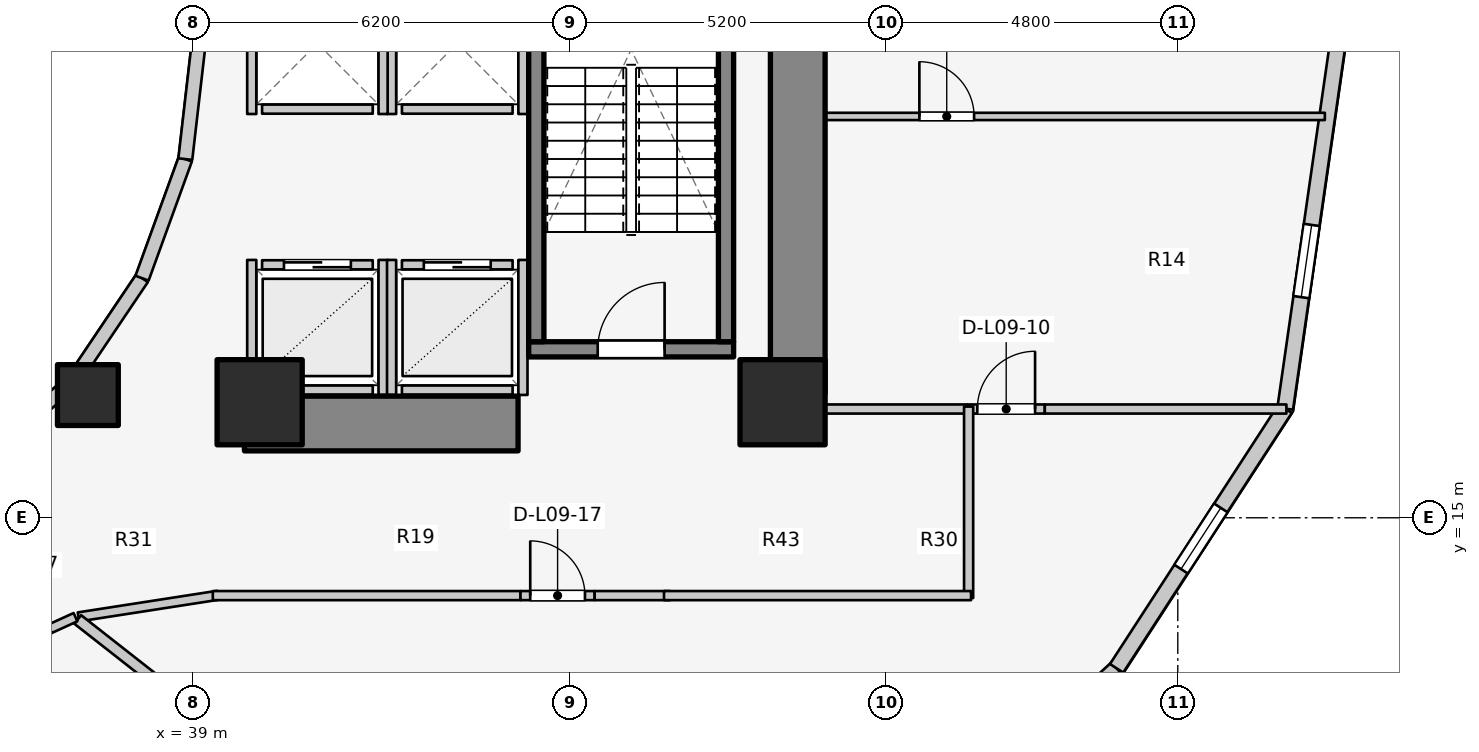
"""IFC4 building model, lengths in metres.
Left out: names, types, materials, properties, quantities, classifications, styles, units other than length and angle.
Written with IfcOpenShell. Run it as: python <this file> out.ifc"""

import sys

from ifc_helpers import new_model, si_unit, direction, frame, frame_2d, origin, origin_2d, place, context, subcontext, project, spatial, rectangle, extrude, element, fill, save


model = new_model("IFC4")
c1 = context("Model", 3, precision=1e-05, world=origin(), true_north=direction((0.0, 1.0)))
c2 = subcontext(c1, "Body", "Model", "MODEL_VIEW")
j1 = project(units=[si_unit("LENGTHUNIT", "METRE"), si_unit("PLANEANGLEUNIT", "RADIAN")], contexts=[c1])
p1 = place(None, origin())
s1 = spatial("IfcSite", under=j1, at=p1, CompositionType="ELEMENT")
p2 = place(p1, origin())
s2 = spatial("IfcBuilding", under=s1, at=p2, CompositionType="ELEMENT")
p3 = place(p2, frame((0.0, 0.0, 33.8)))
s3 = spatial("IfcBuildingStorey", under=s2, at=p3, CompositionType="ELEMENT", Elevation=33.8)
p4 = place(p3, frame((48.95, 17.05, 0.0), z_axis=(0.0, 0.0, 1.0), x_axis=(0.0, 1.0, 0.0)))
e1 = element("IfcWall", 1, at=p4, inside=s3, PredefinedType="SHEAR", context=c2, shape_type="SweptSolid", body=[
    extrude(rectangle(XDim=12.8, YDim=0.9, at=frame_2d((6.4, 0.0))), origin(), (0.0, 0.0, 1.0), 3.1),
])
p5 = place(p3, frame((39.85, 16.55, 0.0), z_axis=(0.0, 0.0, 1.0), x_axis=(1.0, 0.0, 0.0)))
e2 = element("IfcWall", 2, at=p5, inside=s3, PredefinedType="SHEAR", context=c2, shape_type="SweptSolid", body=[
    extrude(rectangle(XDim=4.5, YDim=0.9, at=frame_2d((2.25, 0.0))), origin(), (0.0, 0.0, 1.0), 3.1),
])
p6 = place(p3, frame((44.525, 17.77, 0.0), z_axis=(0.0, 0.0, 1.0), x_axis=(1.0, 0.0, 0.0)))
e3 = element("IfcWall", 3, at=p6, inside=s3, PredefinedType="SOLIDWALL", context=c2, shape_type="SweptSolid", body=[
    extrude(rectangle(XDim=3.37, YDim=0.25, at=frame_2d((1.685, 0.0))), origin(), (0.0, 0.0, 1.0), 3.1),
])
p7 = place(p6, frame((1.135, 0.0, 0.0)))
e4 = element("IfcOpeningElement", 4, at=p7, cuts=e3, PredefinedType="OPENING", context=c2, shape_type="SweptSolid", body=[
    extrude(rectangle(XDim=1.1, YDim=2.1, at=frame_2d((0.55, 1.05))), frame((0.0, 0.135, 0.0), z_axis=(0.0, -1.0, 0.0), x_axis=(1.0, 0.0, 0.0)), (0.0, 0.0, 1.0), 0.27),
])
for number, where, z_axis, x_axis in (
    (5, (44.65, 17.895, 0.0), (0.0, 0.0, 1.0), (0.0, 1.0, 0.0)),
    (6, (47.77, 17.895, 0.0), (0.0, 0.0, 1.0), (0.0, 1.0, 0.0)),
):
    element("IfcWall", number, at=place(p3, frame(where, z_axis=z_axis, x_axis=x_axis)), inside=s3, PredefinedType="SOLIDWALL", context=c2, shape_type="SweptSolid", body=[
        extrude(rectangle(XDim=7.81, YDim=0.25, at=frame_2d((3.905, 0.0))), origin(), (0.0, 0.0, 1.0), 3.1),
    ])
for number, where, z_axis, x_axis in (
    (7, (40.1, 16.9, 0.0), (0.0, 0.0, 1.0), (1.0, 0.0, 0.0)),
    (8, (48.7, 16.9, 0.0), (0.0, 0.0, 1.0), (1.0, 0.0, 0.0)),
):
    element("IfcColumn", number, at=place(p3, frame(where, z_axis=z_axis, x_axis=x_axis)), inside=s3, PredefinedType="COLUMN", context=c2, shape_type="SweptSolid", body=[
        extrude(rectangle(XDim=1.4, YDim=1.4, at=origin_2d()), origin(), (0.0, 0.0, 1.0), 3.1),
    ])
p8 = place(p3, frame((37.275, 17.018, 0.0), z_axis=(0.0, 0.0, 1.0), x_axis=(1.0, 0.0, 0.0)))
e9 = element("IfcColumn", 9, at=p8, inside=s3, PredefinedType="COLUMN", context=c2, shape_type="SweptSolid", body=[
    extrude(rectangle(XDim=1.0, YDim=1.0, at=origin_2d()), origin(), (0.0, 0.0, 1.0), 3.1),
])
p9 = place(p3, frame((35.56, 15.968, 0.0), z_axis=(0.0, 0.0, 1.0), x_axis=(0.752576694707, 0.658504607869, 0.0)))
e10 = element("IfcWall", 10, at=p9, inside=s3, PredefinedType="STANDARD", context=c2, shape_type="SweptSolid", body=[
    extrude(rectangle(XDim=1.959, YDim=0.23, at=frame_2d((0.98, 0.0))), origin(), (0.0, 0.0, 1.0), 1.22),
])
p10 = place(p3, frame((37.035, 17.258, 0.0), z_axis=(0.0, 0.0, 1.0), x_axis=(0.558197800898, 0.829707909492, 0.0)))
e11 = element("IfcWall", 11, at=p10, inside=s3, PredefinedType="STANDARD", context=c2, shape_type="SweptSolid", body=[
    extrude(rectangle(XDim=2.027, YDim=0.23, at=frame_2d((1.013, 0.0))), origin(), (0.0, 0.0, 1.0), 1.22),
])
p11 = place(p3, frame((38.166, 18.94, 0.0), z_axis=(0.0, 0.0, 1.0), x_axis=(0.341423187295, 0.93990968033, 0.0)))
e12 = element("IfcWall", 12, at=p11, inside=s3, PredefinedType="STANDARD", context=c2, shape_type="SweptSolid", body=[
    extrude(rectangle(XDim=2.084, YDim=0.23, at=frame_2d((1.042, 0.0))), origin(), (0.0, 0.0, 1.0), 2.56),
])
p12 = place(p3, frame((38.877, 20.898, 0.0), z_axis=(0.0, 0.0, 1.0), x_axis=(0.114711713601, 0.993398823617, 0.0)))
e13 = element("IfcWall", 13, at=p12, inside=s3, PredefinedType="STANDARD", context=c2, shape_type="SweptSolid", body=[
    extrude(rectangle(XDim=2.115, YDim=0.23, at=frame_2d((1.058, 0.0))), origin(), (0.0, 0.0, 1.0), 2.56),
])
p13 = place(p3, frame((50.405, 9.035, 0.0), z_axis=(0.0, 0.0, 1.0), x_axis=(0.735655109293, 0.67735630223, 0.0)))
e14 = element("IfcWall", 14, at=p13, inside=s3, PredefinedType="STANDARD", context=c2, shape_type="SweptSolid", body=[
    extrude(rectangle(XDim=5.151, YDim=0.26, at=frame_2d((2.575, 0.0))), origin(), (0.0, 0.0, 1.0), 1.22),
])
p14 = place(p13, frame((1.976, 0.0, 0.15)))
e15 = element("IfcOpeningElement", 15, at=p14, cuts=e14, PredefinedType="OPENING", context=c2, shape_type="SweptSolid", body=[
    extrude(rectangle(XDim=1.2, YDim=0.9, at=frame_2d((0.6, 0.45))), frame((0.0, 0.14, 0.0), z_axis=(0.0, -1.0, 0.0), x_axis=(1.0, 0.0, 0.0)), (0.0, 0.0, 1.0), 0.28),
])
p15 = place(p3, frame((54.194, 12.524, 0.0), z_axis=(0.0, 0.0, 1.0), x_axis=(0.544578722263, 0.838709732421, 0.0)))
e16 = element("IfcWall", 16, at=p15, inside=s3, PredefinedType="STANDARD", context=c2, shape_type="SweptSolid", body=[
    extrude(rectangle(XDim=5.092, YDim=0.26, at=frame_2d((2.546, 0.0))), origin(), (0.0, 0.0, 1.0), 1.22),
])
p16 = place(p15, frame((1.946, 0.0, 0.15)))
e17 = element("IfcOpeningElement", 17, at=p16, cuts=e16, PredefinedType="OPENING", context=c2, shape_type="SweptSolid", body=[
    extrude(rectangle(XDim=1.2, YDim=0.9, at=frame_2d((0.6, 0.45))), frame((0.0, 0.14, 0.0), z_axis=(0.0, -1.0, 0.0), x_axis=(1.0, 0.0, 0.0)), (0.0, 0.0, 1.0), 0.28),
])
p17 = place(p3, frame((56.967, 16.795, 0.0), z_axis=(0.0, 0.0, 1.0), x_axis=(0.142528001686, 0.989790770181, 0.0)))
e18 = element("IfcWall", 18, at=p17, inside=s3, PredefinedType="STANDARD", context=c2, shape_type="SweptSolid", body=[
    extrude(rectangle(XDim=6.269, YDim=0.26, at=frame_2d((3.135, 0.0))), origin(), (0.0, 0.0, 1.0), 2.57),
])
p18 = place(p17, frame((1.852, 0.0, 0.75)))
e19 = element("IfcOpeningElement", 19, at=p18, cuts=e18, PredefinedType="OPENING", context=c2, shape_type="SweptSolid", body=[
    extrude(rectangle(XDim=1.2, YDim=1.5, at=frame_2d((0.6, 0.75))), frame((0.0, 0.14, 0.0), z_axis=(0.0, -1.0, 0.0), x_axis=(1.0, 0.0, 0.0)), (0.0, 0.0, 1.0), 0.28),
])
p19 = place(p3, frame((40.14, 19.16, 0.0), z_axis=(0.0, 0.0, 1.0), x_axis=(1.0, 0.0, 0.0)))
e20 = element("IfcWall", 20, at=p19, inside=s3, PredefinedType="SOLIDWALL", context=c2, shape_type="SweptSolid", body=[
    extrude(rectangle(XDim=1.82, YDim=0.15, at=frame_2d((0.91, 0.0))), origin(), (0.0, 0.0, 1.0), 2.12),
])
p20 = place(p19, frame((0.36, 0.0, 0.0)))
e21 = element("IfcOpeningElement", 21, at=p20, cuts=e20, PredefinedType="OPENING", context=c2, shape_type="SweptSolid", body=[
    extrude(rectangle(XDim=1.1, YDim=2.1, at=frame_2d((0.55, 1.05))), frame((0.0, 0.085, 0.0), z_axis=(0.0, -1.0, 0.0), x_axis=(1.0, 0.0, 0.0)), (0.0, 0.0, 1.0), 0.17),
])
p21 = place(p3, frame((40.14, 17.1, 0.0), z_axis=(0.0, 0.0, 1.0), x_axis=(1.0, 0.0, 0.0)))
e22 = element("IfcWall", 22, at=p21, inside=s3, PredefinedType="SOLIDWALL", context=c2, shape_type="SweptSolid", body=[
    extrude(rectangle(XDim=1.82, YDim=0.15, at=frame_2d((0.91, 0.0))), origin(), (0.0, 0.0, 1.0), 2.12),
])
p22 = place(p3, frame((39.97, 17.02, 0.0), z_axis=(0.0, 0.0, 1.0), x_axis=(0.0, 1.0, 0.0)))
e23 = element("IfcWall", 23, at=p22, inside=s3, PredefinedType="SOLIDWALL", context=c2, shape_type="SweptSolid", body=[
    extrude(rectangle(XDim=2.22, YDim=0.15, at=frame_2d((1.11, 0.0))), origin(), (0.0, 0.0, 1.0), 1.873),
])
p23 = place(p3, frame((42.13, 17.02, 0.0), z_axis=(0.0, 0.0, 1.0), x_axis=(0.0, 1.0, 0.0)))
e24 = element("IfcWall", 24, at=p23, inside=s3, PredefinedType="SOLIDWALL", context=c2, shape_type="SweptSolid", body=[
    extrude(rectangle(XDim=2.22, YDim=0.15, at=frame_2d((1.11, 0.0))), origin(), (0.0, 0.0, 1.0), 2.575),
])
p24 = place(p3, frame((42.44, 19.16, 0.0), z_axis=(0.0, 0.0, 1.0), x_axis=(1.0, 0.0, 0.0)))
e25 = element("IfcWall", 25, at=p24, inside=s3, PredefinedType="SOLIDWALL", context=c2, shape_type="SweptSolid", body=[
    extrude(rectangle(XDim=1.82, YDim=0.15, at=frame_2d((0.91, 0.0))), origin(), (0.0, 0.0, 1.0), 2.575),
])
p25 = place(p24, frame((0.36, 0.0, 0.0)))
e26 = element("IfcOpeningElement", 26, at=p25, cuts=e25, PredefinedType="OPENING", context=c2, shape_type="SweptSolid", body=[
    extrude(rectangle(XDim=1.1, YDim=2.1, at=frame_2d((0.55, 1.05))), frame((0.0, 0.085, 0.0), z_axis=(0.0, -1.0, 0.0), x_axis=(1.0, 0.0, 0.0)), (0.0, 0.0, 1.0), 0.17),
])
p26 = place(p3, frame((42.44, 17.1, 0.0), z_axis=(0.0, 0.0, 1.0), x_axis=(1.0, 0.0, 0.0)))
e27 = element("IfcWall", 27, at=p26, inside=s3, PredefinedType="SOLIDWALL", context=c2, shape_type="SweptSolid", body=[
    extrude(rectangle(XDim=1.82, YDim=0.15, at=frame_2d((0.91, 0.0))), origin(), (0.0, 0.0, 1.0), 2.575),
])
p27 = place(p3, frame((42.27, 17.02, 0.0), z_axis=(0.0, 0.0, 1.0), x_axis=(0.0, 1.0, 0.0)))
e28 = element("IfcWall", 28, at=p27, inside=s3, PredefinedType="SOLIDWALL", context=c2, shape_type="SweptSolid", body=[
    extrude(rectangle(XDim=2.22, YDim=0.15, at=frame_2d((1.11, 0.0))), origin(), (0.0, 0.0, 1.0), 2.575),
])
p28 = place(p3, frame((44.43, 17.02, 0.0), z_axis=(0.0, 0.0, 1.0), x_axis=(0.0, 1.0, 0.0)))
e29 = element("IfcWall", 29, at=p28, inside=s3, PredefinedType="SOLIDWALL", context=c2, shape_type="SweptSolid", body=[
    extrude(rectangle(XDim=2.22, YDim=0.15, at=frame_2d((1.11, 0.0))), origin(), (0.0, 0.0, 1.0), 2.12),
])
p29 = place(p3, frame((42.44, 21.72, 0.0), z_axis=(0.0, 0.0, 1.0), x_axis=(1.0, 0.0, 0.0)))
e30 = element("IfcWall", 30, at=p29, inside=s3, PredefinedType="SOLIDWALL", context=c2, shape_type="SweptSolid", body=[
    extrude(rectangle(XDim=1.82, YDim=0.15, at=frame_2d((0.91, 0.0))), origin(), (0.0, 0.0, 1.0), 2.575),
])
for number, where, z_axis, x_axis in (
    (31, (42.27, 21.64, 0.0), (0.0, 0.0, 1.0), (0.0, 1.0, 0.0)),
    (32, (44.43, 21.64, 0.0), (0.0, 0.0, 1.0), (0.0, 1.0, 0.0)),
):
    element("IfcWall", number, at=place(p3, frame(where, z_axis=z_axis, x_axis=x_axis)), inside=s3, PredefinedType="SOLIDWALL", context=c2, shape_type="SweptSolid", body=[
        extrude(rectangle(XDim=2.32, YDim=0.15, at=frame_2d((1.16, 0.0))), origin(), (0.0, 0.0, 1.0), 2.575),
    ])
p30 = place(p3, frame((40.14, 21.72, 0.0), z_axis=(0.0, 0.0, 1.0), x_axis=(1.0, 0.0, 0.0)))
e33 = element("IfcWall", 33, at=p30, inside=s3, PredefinedType="SOLIDWALL", context=c2, shape_type="SweptSolid", body=[
    extrude(rectangle(XDim=1.82, YDim=0.15, at=frame_2d((0.91, 0.0))), origin(), (0.0, 0.0, 1.0), 2.12),
])
p31 = place(p3, frame((39.97, 21.64, 0.0), z_axis=(0.0, 0.0, 1.0), x_axis=(0.0, 1.0, 0.0)))
e34 = element("IfcWall", 34, at=p31, inside=s3, PredefinedType="SOLIDWALL", context=c2, shape_type="SweptSolid", body=[
    extrude(rectangle(XDim=2.32, YDim=0.15, at=frame_2d((1.16, 0.0))), origin(), (0.0, 0.0, 1.0), 2.12),
])
p32 = place(p3, frame((42.13, 21.64, 0.0), z_axis=(0.0, 0.0, 1.0), x_axis=(0.0, 1.0, 0.0)))
e35 = element("IfcWall", 35, at=p32, inside=s3, PredefinedType="SOLIDWALL", context=c2, shape_type="SweptSolid", body=[
    extrude(rectangle(XDim=2.32, YDim=0.15, at=frame_2d((1.16, 0.0))), origin(), (0.0, 0.0, 1.0), 2.575),
])
p33 = place(p3, frame((48.95, 16.788, 0.0), z_axis=(0.0, 0.0, 1.0), x_axis=(1.0, 0.0, 0.0)))
e36 = element("IfcWall", 36, at=p33, inside=s3, PredefinedType="PARTITIONING", context=c2, shape_type="SweptSolid", body=[
    extrude(rectangle(XDim=2.793, YDim=0.15, at=frame_2d((1.396, 0.0))), origin(), (0.0, 0.0, 1.0), 1.22),
])
p34 = place(p3, frame((51.743, 16.788, 0.0), z_axis=(0.0, 0.0, 1.0), x_axis=(1.0, 0.0, 0.0)))
e37 = element("IfcWall", 37, at=p34, inside=s3, PredefinedType="PARTITIONING", context=c2, shape_type="SweptSolid", body=[
    extrude(rectangle(XDim=1.27, YDim=0.15, at=frame_2d((0.635, 0.0))), origin(), (0.0, 0.0, 1.0), 2.575),
])
p35 = place(p34, frame((0.16, 0.0, 0.0)))
e38 = element("IfcOpeningElement", 38, at=p35, cuts=e37, PredefinedType="OPENING", context=c2, shape_type="SweptSolid", body=[
    extrude(rectangle(XDim=0.95, YDim=2.1, at=frame_2d((0.475, 1.05))), frame((0.0, 0.085, 0.0), z_axis=(0.0, -1.0, 0.0), x_axis=(1.0, 0.0, 0.0)), (0.0, 0.0, 1.0), 0.17),
])
p36 = place(p3, frame((53.013, 16.788, 0.0), z_axis=(0.0, 0.0, 1.0), x_axis=(1.0, 0.0, 0.0)))
e39 = element("IfcWall", 39, at=p36, inside=s3, PredefinedType="PARTITIONING", context=c2, shape_type="SweptSolid", body=[
    extrude(rectangle(XDim=3.973, YDim=0.15, at=frame_2d((1.987, 0.0))), origin(), (0.0, 0.0, 1.0), 2.575),
])
p37 = place(p3, frame((48.95, 21.6, 0.0), z_axis=(0.0, 0.0, 1.0), x_axis=(1.0, 0.0, 0.0)))
e40 = element("IfcWall", 40, at=p37, inside=s3, PredefinedType="MOVABLE", context=c2, shape_type="SweptSolid", body=[
    extrude(rectangle(XDim=8.669, YDim=0.12, at=frame_2d((4.334, 0.0))), origin(), (0.0, 0.0, 1.0), 2.575),
])
p38 = place(p37, frame((2.0, 0.0, 0.0)))
e41 = element("IfcOpeningElement", 41, at=p38, cuts=e40, PredefinedType="OPENING", context=c2, shape_type="SweptSolid", body=[
    extrude(rectangle(XDim=0.9, YDim=2.1, at=frame_2d((0.45, 1.05))), frame((0.0, 0.07, 0.0), z_axis=(0.0, -1.0, 0.0), x_axis=(1.0, 0.0, 0.0)), (0.0, 0.0, 1.0), 0.14),
])
p39 = place(p3, frame((51.76, 13.68, 0.0), z_axis=(0.0, 0.0, 1.0), x_axis=(0.0, 1.0, 0.0)))
e42 = element("IfcWall", 42, at=p39, inside=s3, PredefinedType="PARTITIONING", context=c2, shape_type="SweptSolid", body=[
    extrude(rectangle(XDim=3.148, YDim=0.15, at=frame_2d((1.574, 0.0))), origin(), (0.0, 0.0, 1.0), 2.575),
])
p40 = place(p3, frame((37.119, 13.369, 0.0), z_axis=(0.0, 0.0, 1.0), x_axis=(0.988184633586, 0.153268163508, 0.0)))
e43 = element("IfcWall", 43, at=p40, inside=s3, PredefinedType="PARTITIONING", context=c2, shape_type="SweptSolid", body=[
    extrude(rectangle(XDim=2.318, YDim=0.15, at=frame_2d((1.159, 0.0))), origin(), (0.0, 0.0, 1.0), 1.22),
])
p41 = place(p3, frame((39.33, 13.72, 0.0), z_axis=(0.0, 0.0, 1.0), x_axis=(1.0, 0.0, 0.0)))
e44 = element("IfcWall", 44, at=p41, inside=s3, PredefinedType="PARTITIONING", context=c2, shape_type="SweptSolid", body=[
    extrude(rectangle(XDim=5.06, YDim=0.15, at=frame_2d((2.53, 0.0))), origin(), (0.0, 0.0, 1.0), 1.22),
])
p42 = place(p3, frame((44.39, 13.72, 0.0), z_axis=(0.0, 0.0, 1.0), x_axis=(1.0, 0.0, 0.0)))
e45 = element("IfcWall", 45, at=p42, inside=s3, PredefinedType="PARTITIONING", context=c2, shape_type="SweptSolid", body=[
    extrude(rectangle(XDim=1.22, YDim=0.15, at=frame_2d((0.61, 0.0))), origin(), (0.0, 0.0, 1.0), 2.575),
])
p43 = place(p42, frame((0.16, 0.0, 0.0)))
e46 = element("IfcOpeningElement", 46, at=p43, cuts=e45, PredefinedType="OPENING", context=c2, shape_type="SweptSolid", body=[
    extrude(rectangle(XDim=0.9, YDim=2.1, at=frame_2d((0.45, 1.05))), frame((0.0, 0.085, 0.0), z_axis=(0.0, -1.0, 0.0), x_axis=(1.0, 0.0, 0.0)), (0.0, 0.0, 1.0), 0.17),
])
p44 = place(p3, frame((45.61, 13.72, 0.0), z_axis=(0.0, 0.0, 1.0), x_axis=(1.0, 0.0, 0.0)))
e47 = element("IfcWall", 47, at=p44, inside=s3, PredefinedType="PARTITIONING", context=c2, shape_type="SweptSolid", body=[
    extrude(rectangle(XDim=1.24, YDim=0.15, at=frame_2d((0.62, 0.0))), origin(), (0.0, 0.0, 1.0), 2.575),
])
p45 = place(p3, frame((46.75, 13.72, 0.0), z_axis=(0.0, 0.0, 1.0), x_axis=(1.0, 0.0, 0.0)))
e48 = element("IfcWall", 48, at=p45, inside=s3, PredefinedType="PARTITIONING", context=c2, shape_type="SweptSolid", body=[
    extrude(rectangle(XDim=5.05, YDim=0.15, at=frame_2d((2.525, 0.0))), origin(), (0.0, 0.0, 1.0), 1.22),
])
p46 = place(p3, frame((37.108, 13.327, 0.0), z_axis=(0.0, 0.0, 1.0), x_axis=(0.78700868866, -0.616941912966, 0.0)))
e49 = element("IfcWall", 49, at=p46, inside=s3, PredefinedType="PARTITIONING", context=c2, shape_type="SweptSolid", body=[
    extrude(rectangle(XDim=10.583, YDim=0.18, at=frame_2d((5.292, 0.0))), origin(), (0.0, 0.0, 1.0), 1.22),
])
p47 = place(p3, frame((35.494, 12.647, 0.0), z_axis=(0.0, 0.0, 1.0), x_axis=(0.910168885926, 0.414237370469, 0.0)))
e50 = element("IfcWall", 50, at=p47, inside=s3, PredefinedType="PARTITIONING", context=c2, shape_type="SweptSolid", body=[
    extrude(rectangle(XDim=1.27, YDim=0.15, at=frame_2d((0.635, 0.0))), origin(), (0.0, 0.0, 1.0), 2.16),
])
p48 = place(p47, frame((0.16, 0.0, 0.0)))
e51 = element("IfcOpeningElement", 51, at=p48, cuts=e50, PredefinedType="OPENING", context=c2, shape_type="SweptSolid", body=[
    extrude(rectangle(XDim=0.95, YDim=2.1, at=frame_2d((0.475, 1.05))), frame((0.0, 0.085, 0.0), z_axis=(0.0, -1.0, 0.0), x_axis=(1.0, 0.0, 0.0)), (0.0, 0.0, 1.0), 0.17),
])
p49 = place(p3, frame((36.65, 13.173, 0.0), z_axis=(0.0, 0.0, 1.0), x_axis=(0.910185690705, 0.414200444756, 0.0)))
e52 = element("IfcWall", 52, at=p49, inside=s3, PredefinedType="PARTITIONING", context=c2, shape_type="SweptSolid", body=[
    extrude(rectangle(XDim=0.463, YDim=0.15, at=frame_2d((0.231, 0.0))), origin(), (0.0, 0.0, 1.0), 2.575),
])
p50 = place(p16, origin())
e53 = element("IfcWindow", 53, at=p50, inside=s3, PartitioningType="SINGLE_PANEL", PredefinedType="WINDOW", context=c2, shape_type="SweptSolid", body=[
    extrude(rectangle(XDim=1.2, YDim=0.9, at=frame_2d((0.6, 0.45))), frame((0.0, 0.03, 0.0), z_axis=(0.0, -1.0, 0.0), x_axis=(1.0, 0.0, 0.0)), (0.0, 0.0, 1.0), 0.06),
])
fill(e17, e53)
p51 = place(p18, origin())
e54 = element("IfcWindow", 54, at=p51, inside=s3, PartitioningType="SINGLE_PANEL", PredefinedType="WINDOW", context=c2, shape_type="SweptSolid", body=[
    extrude(rectangle(XDim=1.2, YDim=1.5, at=frame_2d((0.6, 0.75))), frame((0.0, 0.03, 0.0), z_axis=(0.0, -1.0, 0.0), x_axis=(1.0, 0.0, 0.0)), (0.0, 0.0, 1.0), 0.06),
])
fill(e19, e54)
p52 = place(p7, origin())
e55 = element("IfcDoor", 55, at=p52, inside=s3, OperationType="SINGLE_SWING_RIGHT", PredefinedType="DOOR", context=c2, shape_type="SweptSolid", body=[
    extrude(rectangle(XDim=1.1, YDim=2.1, at=frame_2d((0.55, 1.05))), frame((0.0, 0.025, 0.0), z_axis=(0.0, -1.0, 0.0), x_axis=(1.0, 0.0, 0.0)), (0.0, 0.0, 1.0), 0.05),
])
fill(e4, e55)
p53 = place(p20, origin())
e56 = element("IfcDoor", 56, at=p53, inside=s3, OperationType="DOUBLE_DOOR_SLIDING", PredefinedType="DOOR", context=c2, shape_type="SweptSolid", body=[
    extrude(rectangle(XDim=1.1, YDim=2.1, at=frame_2d((0.55, 1.05))), frame((0.0, 0.025, 0.0), z_axis=(0.0, -1.0, 0.0), x_axis=(1.0, 0.0, 0.0)), (0.0, 0.0, 1.0), 0.05),
])
fill(e21, e56)
p54 = place(p25, origin())
e57 = element("IfcDoor", 57, at=p54, inside=s3, OperationType="DOUBLE_DOOR_SLIDING", PredefinedType="DOOR", context=c2, shape_type="SweptSolid", body=[
    extrude(rectangle(XDim=1.1, YDim=2.1, at=frame_2d((0.55, 1.05))), frame((0.0, 0.025, 0.0), z_axis=(0.0, -1.0, 0.0), x_axis=(1.0, 0.0, 0.0)), (0.0, 0.0, 1.0), 0.05),
])
fill(e26, e57)
p55 = place(p35, origin())
e58 = element("IfcDoor", 58, at=p55, inside=s3, OperationType="SINGLE_SWING_RIGHT", PredefinedType="DOOR", context=c2, shape_type="SweptSolid", body=[
    extrude(rectangle(XDim=0.95, YDim=2.1, at=frame_2d((0.475, 1.05))), frame((0.0, 0.025, 0.0), z_axis=(0.0, -1.0, 0.0), x_axis=(1.0, 0.0, 0.0)), (0.0, 0.0, 1.0), 0.05),
])
fill(e38, e58)
p56 = place(p38, origin())
e59 = element("IfcDoor", 59, at=p56, inside=s3, OperationType="SINGLE_SWING_LEFT", PredefinedType="DOOR", context=c2, shape_type="SweptSolid", body=[
    extrude(rectangle(XDim=0.9, YDim=2.1, at=frame_2d((0.45, 1.05))), frame((0.0, 0.025, 0.0), z_axis=(0.0, -1.0, 0.0), x_axis=(1.0, 0.0, 0.0)), (0.0, 0.0, 1.0), 0.05),
])
fill(e41, e59)
p57 = place(p43, origin())
e60 = element("IfcDoor", 60, at=p57, inside=s3, OperationType="SINGLE_SWING_LEFT", PredefinedType="DOOR", context=c2, shape_type="SweptSolid", body=[
    extrude(rectangle(XDim=0.9, YDim=2.1, at=frame_2d((0.45, 1.05))), frame((0.0, 0.025, 0.0), z_axis=(0.0, -1.0, 0.0), x_axis=(1.0, 0.0, 0.0)), (0.0, 0.0, 1.0), 0.05),
])
fill(e46, e60)
save(model, sys.argv[1])
